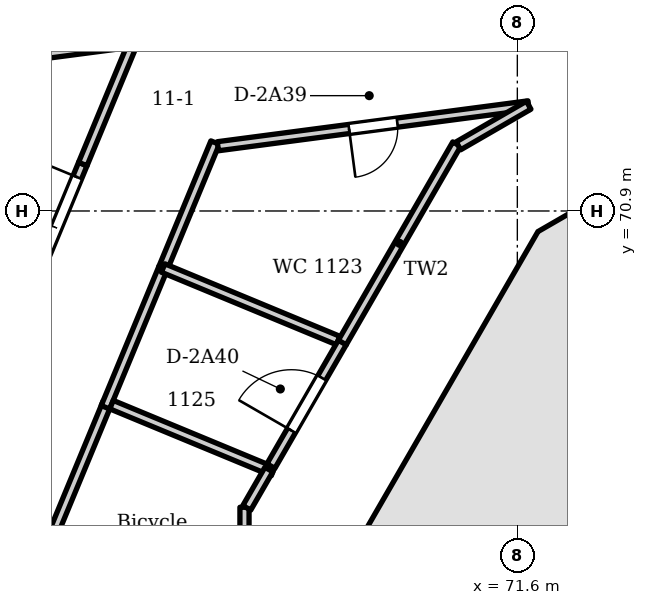
"""IFC4 building model, lengths in metres.
Left out: names, types, materials, properties, quantities, classifications, styles, units other than length and angle.
Written with IfcOpenShell. Run it as: python <this file> out.ifc"""

import sys

from ifc_helpers import new_model, si_unit, direction, frame, frame_2d, origin, place, context, subcontext, project, spatial, polyline, rectangle, outline, extrude, element, fill, save


model = new_model("IFC4")
c1 = context("Model", 3, precision=1e-05, world=origin(), true_north=direction((0.0, 1.0)))
c2 = subcontext(c1, "Body", "Model", "MODEL_VIEW")
j1 = project(units=[si_unit("LENGTHUNIT", "METRE"), si_unit("PLANEANGLEUNIT", "RADIAN")], contexts=[c1])
p1 = place(None, origin())
s1 = spatial("IfcSite", under=j1, at=p1, CompositionType="ELEMENT")
p2 = place(p1, origin())
s2 = spatial("IfcBuilding", under=s1, at=p2, CompositionType="ELEMENT")
p3 = place(p2, frame((0.0, 0.0, 50.4)))
s3 = spatial("IfcBuildingStorey", under=s2, at=p3, CompositionType="ELEMENT", Elevation=50.4)
p4 = place(p3, frame((77.35, 72.992, 0.0), z_axis=(0.0, 0.0, 1.0), x_axis=(-0.866037463336, -0.499979111662, 0.0)))
e1 = element("IfcWall", 1, at=p4, inside=s3, PredefinedType="SHEAR", context=c2, shape_type="SweptSolid", body=[
    extrude(outline(polyline([(0.0, -0.6), (5.901, -0.6), (5.58, 0.6), (0.322, 0.6), (0.0, -0.6)])), origin(), (0.0, 0.0, 1.0), 3.6),
])
p5 = place(p4, frame((1.175, 0.0, 0.0)))
e2 = element("IfcOpeningElement", 2, at=p5, cuts=e1, PredefinedType="OPENING", context=c2, shape_type="SweptSolid", body=[
    extrude(rectangle(XDim=0.9, YDim=2.1, at=frame_2d((0.45, 1.05))), frame((0.0, 0.61, 0.0), z_axis=(0.0, -1.0, 0.0), x_axis=(1.0, 0.0, 0.0)), (0.0, 0.0, 1.0), 1.22),
])
p6 = place(p3, frame((72.458, 70.261, 0.0), z_axis=(0.0, 0.0, 1.0), x_axis=(-0.499979111662, -0.866037463336, 0.0)))
e3 = element("IfcWall", 3, at=p6, inside=s3, PredefinedType="SHEAR", context=c2, shape_type="SweptSolid", body=[
    extrude(outline(polyline([(0.0, -0.6), (5.901, -0.6), (5.58, 0.6), (0.322, 0.6), (0.0, -0.6)])), origin(), (0.0, 0.0, 1.0), 3.6),
])
p7 = place(p6, frame((1.75, 0.0, 0.0)))
e4 = element("IfcOpeningElement", 4, at=p7, cuts=e3, PredefinedType="OPENING", context=c2, shape_type="SweptSolid", body=[
    extrude(rectangle(XDim=2.4, YDim=2.1, at=frame_2d((1.2, 1.05))), frame((0.0, 0.61, 0.0), z_axis=(0.0, -1.0, 0.0), x_axis=(1.0, 0.0, 0.0)), (0.0, 0.0, 1.0), 1.22),
])
p8 = place(p3, frame((76.381, 63.031, 0.0), z_axis=(0.0, 0.0, 1.0), x_axis=(-0.866032150378, 0.499988314375, 0.0)))
e5 = element("IfcWall", 5, at=p8, inside=s3, PredefinedType="SHEAR", context=c2, shape_type="SweptSolid", body=[
    extrude(rectangle(XDim=6.412, YDim=0.3, at=frame_2d((3.206, 0.0))), origin(), (0.0, 0.0, 1.0), 3.6),
])
p9 = place(p8, frame((3.55, 0.0, 0.0)))
e6 = element("IfcOpeningElement", 6, at=p9, cuts=e5, PredefinedType="OPENING", context=c2, shape_type="SweptSolid", body=[
    extrude(rectangle(XDim=1.0, YDim=2.1, at=frame_2d((0.5, 1.05))), frame((0.0, 0.16, 0.0), z_axis=(0.0, -1.0, 0.0), x_axis=(1.0, 0.0, 0.0)), (0.0, 0.0, 1.0), 0.32),
])
p10 = place(p3, frame((77.731, 65.369, 0.0), z_axis=(0.0, 0.0, 1.0), x_axis=(-0.866022631842, 0.500004801114, 0.0)))
e7 = element("IfcWall", 7, at=p10, inside=s3, PredefinedType="SHEAR", context=c2, shape_type="SweptSolid", body=[
    extrude(rectangle(XDim=6.412, YDim=0.3, at=frame_2d((3.206, 0.0))), origin(), (0.0, 0.0, 1.0), 3.6),
])
p11 = place(p10, frame((3.55, 0.0, 0.0)))
e8 = element("IfcOpeningElement", 8, at=p11, cuts=e7, PredefinedType="OPENING", context=c2, shape_type="SweptSolid", body=[
    extrude(rectangle(XDim=1.0, YDim=2.1, at=frame_2d((0.5, 1.05))), frame((0.0, 0.16, 0.0), z_axis=(0.0, -1.0, 0.0), x_axis=(1.0, 0.0, 0.0)), (0.0, 0.0, 1.0), 0.32),
])
p12 = place(p3, frame((79.969, 32.624, 0.0), z_axis=(0.0, 0.0, 1.0), x_axis=(-0.608761526367, 0.793353265585, 0.0)))
e9 = element("IfcWall", 9, at=p12, inside=s3, PredefinedType="SOLIDWALL", context=c2, shape_type="SweptSolid", body=[
    extrude(outline(polyline([(0.149, 0.075), (0.149, -0.075), (47.217, -0.075), (47.217, 0.075), (0.149, 0.075)])), origin(), (0.0, 0.0, 1.0), 3.3),
])
p13 = place(p12, frame((1.222, 0.0, 0.0)))
e10 = element("IfcOpeningElement", 10, at=p13, cuts=e9, PredefinedType="OPENING", context=c2, shape_type="SweptSolid", body=[
    extrude(rectangle(XDim=1.8, YDim=2.6, at=frame_2d((0.9, 1.3))), frame((0.0, 0.085, 0.0), z_axis=(0.0, -1.0, 0.0), x_axis=(1.0, 0.0, 0.0)), (0.0, 0.0, 1.0), 0.17),
])
p14 = place(p12, frame((4.565, 0.0, 0.0)))
e11 = element("IfcOpeningElement", 11, at=p14, cuts=e9, PredefinedType="OPENING", context=c2, shape_type="SweptSolid", body=[
    extrude(rectangle(XDim=1.8, YDim=2.6, at=frame_2d((0.9, 1.3))), frame((0.0, 0.085, 0.0), z_axis=(0.0, -1.0, 0.0), x_axis=(1.0, 0.0, 0.0)), (0.0, 0.0, 1.0), 0.17),
])
p15 = place(p12, frame((8.209, 0.0, 0.0)))
e12 = element("IfcOpeningElement", 12, at=p15, cuts=e9, PredefinedType="OPENING", context=c2, shape_type="SweptSolid", body=[
    extrude(rectangle(XDim=1.8, YDim=2.6, at=frame_2d((0.9, 1.3))), frame((0.0, 0.085, 0.0), z_axis=(0.0, -1.0, 0.0), x_axis=(1.0, 0.0, 0.0)), (0.0, 0.0, 1.0), 0.17),
])
p16 = place(p12, frame((12.453, 0.0, 0.0)))
e13 = element("IfcOpeningElement", 13, at=p16, cuts=e9, PredefinedType="OPENING", context=c2, shape_type="SweptSolid", body=[
    extrude(rectangle(XDim=1.8, YDim=2.6, at=frame_2d((0.9, 1.3))), frame((0.0, 0.085, 0.0), z_axis=(0.0, -1.0, 0.0), x_axis=(1.0, 0.0, 0.0)), (0.0, 0.0, 1.0), 0.17),
])
p17 = place(p12, frame((15.496, 0.0, 0.0)))
e14 = element("IfcOpeningElement", 14, at=p17, cuts=e9, PredefinedType="OPENING", context=c2, shape_type="SweptSolid", body=[
    extrude(rectangle(XDim=1.8, YDim=2.6, at=frame_2d((0.9, 1.3))), frame((0.0, 0.085, 0.0), z_axis=(0.0, -1.0, 0.0), x_axis=(1.0, 0.0, 0.0)), (0.0, 0.0, 1.0), 0.17),
])
p18 = place(p12, frame((18.84, 0.0, 0.15)))
e15 = element("IfcOpeningElement", 15, at=p18, cuts=e9, PredefinedType="OPENING", context=c2, shape_type="SweptSolid", body=[
    extrude(rectangle(XDim=2.4, YDim=2.45, at=frame_2d((1.2, 1.225))), frame((0.0, 0.085, 0.0), z_axis=(0.0, -1.0, 0.0), x_axis=(1.0, 0.0, 0.0)), (0.0, 0.0, 1.0), 0.17),
])
p19 = place(p12, frame((22.783, 0.0, 0.0)))
e16 = element("IfcOpeningElement", 16, at=p19, cuts=e9, PredefinedType="OPENING", context=c2, shape_type="SweptSolid", body=[
    extrude(rectangle(XDim=1.8, YDim=2.6, at=frame_2d((0.9, 1.3))), frame((0.0, 0.085, 0.0), z_axis=(0.0, -1.0, 0.0), x_axis=(1.0, 0.0, 0.0)), (0.0, 0.0, 1.0), 0.17),
])
p20 = place(p12, frame((26.127, 0.0, 0.15)))
e17 = element("IfcOpeningElement", 17, at=p20, cuts=e9, PredefinedType="OPENING", context=c2, shape_type="SweptSolid", body=[
    extrude(rectangle(XDim=2.4, YDim=2.45, at=frame_2d((1.2, 1.225))), frame((0.0, 0.085, 0.0), z_axis=(0.0, -1.0, 0.0), x_axis=(1.0, 0.0, 0.0)), (0.0, 0.0, 1.0), 0.17),
])
p21 = place(p12, frame((30.071, 0.0, 0.0)))
e18 = element("IfcOpeningElement", 18, at=p21, cuts=e9, PredefinedType="OPENING", context=c2, shape_type="SweptSolid", body=[
    extrude(rectangle(XDim=1.8, YDim=2.6, at=frame_2d((0.9, 1.3))), frame((0.0, 0.085, 0.0), z_axis=(0.0, -1.0, 0.0), x_axis=(1.0, 0.0, 0.0)), (0.0, 0.0, 1.0), 0.17),
])
p22 = place(p12, frame((33.114, 0.0, 0.0)))
e19 = element("IfcOpeningElement", 19, at=p22, cuts=e9, PredefinedType="OPENING", context=c2, shape_type="SweptSolid", body=[
    extrude(rectangle(XDim=1.8, YDim=2.6, at=frame_2d((0.9, 1.3))), frame((0.0, 0.085, 0.0), z_axis=(0.0, -1.0, 0.0), x_axis=(1.0, 0.0, 0.0)), (0.0, 0.0, 1.0), 0.17),
])
p23 = place(p12, frame((37.358, 0.0, 0.0)))
e20 = element("IfcOpeningElement", 20, at=p23, cuts=e9, PredefinedType="OPENING", context=c2, shape_type="SweptSolid", body=[
    extrude(rectangle(XDim=1.8, YDim=2.6, at=frame_2d((0.9, 1.3))), frame((0.0, 0.085, 0.0), z_axis=(0.0, -1.0, 0.0), x_axis=(1.0, 0.0, 0.0)), (0.0, 0.0, 1.0), 0.17),
])
p24 = place(p12, frame((41.001, 0.0, 0.0)))
e21 = element("IfcOpeningElement", 21, at=p24, cuts=e9, PredefinedType="OPENING", context=c2, shape_type="SweptSolid", body=[
    extrude(rectangle(XDim=1.8, YDim=2.6, at=frame_2d((0.9, 1.3))), frame((0.0, 0.085, 0.0), z_axis=(0.0, -1.0, 0.0), x_axis=(1.0, 0.0, 0.0)), (0.0, 0.0, 1.0), 0.17),
])
p25 = place(p12, frame((44.345, 0.0, 0.0)))
e22 = element("IfcOpeningElement", 22, at=p25, cuts=e9, PredefinedType="OPENING", context=c2, shape_type="SweptSolid", body=[
    extrude(rectangle(XDim=1.8, YDim=2.6, at=frame_2d((0.9, 1.3))), frame((0.0, 0.085, 0.0), z_axis=(0.0, -1.0, 0.0), x_axis=(1.0, 0.0, 0.0)), (0.0, 0.0, 1.0), 0.17),
])
p26 = place(p3, frame((57.534, 70.427, 0.0), z_axis=(0.0, 0.0, 1.0), x_axis=(0.608794371867, -0.793328061261, 0.0)))
e23 = element("IfcWall", 23, at=p26, inside=s3, PredefinedType="PARTITIONING", context=c2, shape_type="SweptSolid", body=[
    extrude(rectangle(XDim=19.759, YDim=0.15, at=frame_2d((9.88, 0.0))), origin(), (0.0, 0.0, 1.0), 3.3),
])
p27 = place(p26, frame((18.293, 0.0, 0.0)))
e24 = element("IfcOpeningElement", 24, at=p27, cuts=e23, PredefinedType="OPENING", context=c2, shape_type="SweptSolid", body=[
    extrude(rectangle(XDim=0.9, YDim=2.1, at=frame_2d((0.45, 1.05))), frame((0.0, 0.085, 0.0), z_axis=(0.0, -1.0, 0.0), x_axis=(1.0, 0.0, 0.0)), (0.0, 0.0, 1.0), 0.17),
])
p28 = place(p26, frame((17.093, 0.0, 0.0)))
e25 = element("IfcOpeningElement", 25, at=p28, cuts=e23, PredefinedType="OPENING", context=c2, shape_type="SweptSolid", body=[
    extrude(rectangle(XDim=0.9, YDim=2.1, at=frame_2d((0.45, 1.05))), frame((0.0, 0.085, 0.0), z_axis=(0.0, -1.0, 0.0), x_axis=(1.0, 0.0, 0.0)), (0.0, 0.0, 1.0), 0.17),
])
p29 = place(p26, frame((11.006, 0.0, 0.0)))
e26 = element("IfcOpeningElement", 26, at=p29, cuts=e23, PredefinedType="OPENING", context=c2, shape_type="SweptSolid", body=[
    extrude(rectangle(XDim=0.9, YDim=2.1, at=frame_2d((0.45, 1.05))), frame((0.0, 0.085, 0.0), z_axis=(0.0, -1.0, 0.0), x_axis=(1.0, 0.0, 0.0)), (0.0, 0.0, 1.0), 0.17),
])
p30 = place(p26, frame((9.806, 0.0, 0.0)))
e27 = element("IfcOpeningElement", 27, at=p30, cuts=e23, PredefinedType="OPENING", context=c2, shape_type="SweptSolid", body=[
    extrude(rectangle(XDim=0.9, YDim=2.1, at=frame_2d((0.45, 1.05))), frame((0.0, 0.085, 0.0), z_axis=(0.0, -1.0, 0.0), x_axis=(1.0, 0.0, 0.0)), (0.0, 0.0, 1.0), 0.17),
])
p31 = place(p3, frame((62.522, 67.007, 0.0), z_axis=(0.0, 0.0, 1.0), x_axis=(0.382650715136, 0.923893083753, 0.0)))
e28 = element("IfcWall", 28, at=p31, inside=s3, PredefinedType="PARTITIONING", context=c2, shape_type="SweptSolid", body=[
    extrude(rectangle(XDim=5.049, YDim=0.15, at=frame_2d((2.525, 0.0))), origin(), (0.0, 0.0, 1.0), 2.75),
])
p32 = place(p31, frame((3.014, 0.0, 0.0)))
e29 = element("IfcOpeningElement", 29, at=p32, cuts=e28, PredefinedType="OPENING", context=c2, shape_type="SweptSolid", body=[
    extrude(rectangle(XDim=1.8, YDim=2.1, at=frame_2d((0.9, 1.05))), frame((0.0, 0.085, 0.0), z_axis=(0.0, -1.0, 0.0), x_axis=(1.0, 0.0, 0.0)), (0.0, 0.0, 1.0), 0.17),
])
p33 = place(p3, frame((63.723, 73.467, 0.0), z_axis=(0.0, 0.0, 1.0), x_axis=(0.991489487772, 0.130186772134, 0.0)))
e30 = element("IfcWall", 30, at=p33, inside=s3, PredefinedType="PARTITIONING", context=c2, shape_type="SweptSolid", body=[
    extrude(rectangle(XDim=1.958, YDim=0.15, at=frame_2d((0.979, 0.0))), origin(), (0.0, 0.0, 1.0), 3.3),
])
p34 = place(p3, frame((63.811, 65.22, 0.0), z_axis=(0.0, 0.0, 1.0), x_axis=(0.382485754441, 0.923961388614, 0.0)))
e31 = element("IfcWall", 31, at=p34, inside=s3, PredefinedType="PARTITIONING", context=c2, shape_type="SweptSolid", body=[
    extrude(rectangle(XDim=2.736, YDim=0.15, at=frame_2d((1.368, 0.0))), origin(), (0.0, 0.0, 1.0), 3.3),
])
p35 = place(p3, frame((64.454, 71.672, 0.0), z_axis=(0.0, 0.0, 1.0), x_axis=(0.382922635391, 0.923780415091, 0.0)))
e32 = element("IfcWall", 32, at=p35, inside=s3, PredefinedType="PARTITIONING", context=c2, shape_type="SweptSolid", body=[
    extrude(rectangle(XDim=2.09, YDim=0.15, at=frame_2d((1.045, 0.0))), origin(), (0.0, 0.0, 1.0), 3.3),
])
p36 = place(p3, frame((64.826, 67.672, 0.0), z_axis=(0.0, 0.0, 1.0), x_axis=(0.382785873713, 0.923837093261, 0.0)))
e33 = element("IfcWall", 33, at=p36, inside=s3, PredefinedType="PARTITIONING", context=c2, shape_type="SweptSolid", body=[
    extrude(rectangle(XDim=2.484, YDim=0.15, at=frame_2d((1.242, 0.0))), origin(), (0.0, 0.0, 1.0), 2.75),
])
p37 = place(p3, frame((64.926, 67.715, 0.0), z_axis=(0.0, 0.0, 1.0), x_axis=(0.923886418472, -0.382666807761, 0.0)))
e34 = element("IfcWall", 34, at=p37, inside=s3, PredefinedType="PARTITIONING", context=c2, shape_type="SweptSolid", body=[
    extrude(rectangle(XDim=2.875, YDim=0.15, at=frame_2d((1.438, 0.0))), origin(), (0.0, 0.0, 1.0), 3.3),
])
p38 = place(p3, frame((65.774, 69.958, 0.0), z_axis=(0.0, 0.0, 1.0), x_axis=(0.382599241046, 0.923914401203, 0.0)))
e35 = element("IfcWall", 35, at=p38, inside=s3, PredefinedType="PARTITIONING", context=c2, shape_type="SweptSolid", body=[
    extrude(rectangle(XDim=2.237, YDim=0.15, at=frame_2d((1.118, 0.0))), origin(), (0.0, 0.0, 1.0), 3.3),
])
p39 = place(p3, frame((65.775, 69.962, 0.0), z_axis=(0.0, 0.0, 1.0), x_axis=(0.923918484918, -0.382589379397, 0.0)))
e36 = element("IfcWall", 36, at=p39, inside=s3, PredefinedType="PARTITIONING", context=c2, shape_type="SweptSolid", body=[
    extrude(rectangle(XDim=3.116, YDim=0.15, at=frame_2d((1.558, 0.0))), origin(), (0.0, 0.0, 1.0), 3.3),
])
p40 = place(p3, frame((66.675, 71.965, 0.0), z_axis=(0.0, 0.0, 1.0), x_axis=(0.991459293276, 0.130416524172, 0.0)))
e37 = element("IfcWall", 37, at=p40, inside=s3, PredefinedType="PARTITIONING", context=c2, shape_type="SweptSolid", body=[
    extrude(rectangle(XDim=5.154, YDim=0.15, at=frame_2d((2.577, 0.0))), origin(), (0.0, 0.0, 1.0), 3.3),
])
p41 = place(p40, frame((2.176, 0.0, 0.0)))
e38 = element("IfcOpeningElement", 38, at=p41, cuts=e37, PredefinedType="OPENING", context=c2, shape_type="SweptSolid", body=[
    extrude(rectangle(XDim=0.8, YDim=2.1, at=frame_2d((0.4, 1.05))), frame((0.0, 0.085, 0.0), z_axis=(0.0, -1.0, 0.0), x_axis=(1.0, 0.0, 0.0)), (0.0, 0.0, 1.0), 0.17),
])
p42 = place(p3, frame((67.113, 61.094, 0.0), z_axis=(0.0, 0.0, 1.0), x_axis=(0.0, 1.0, 0.0)))
e39 = element("IfcWall", 39, at=p42, inside=s3, PredefinedType="PARTITIONING", context=c2, shape_type="SweptSolid", body=[
    extrude(rectangle(XDim=4.934, YDim=0.15, at=frame_2d((2.467, 0.0))), origin(), (0.0, 0.0, 1.0), 3.3),
])
p43 = place(p3, frame((67.15, 66.018, 0.0), z_axis=(0.0, 0.0, 1.0), x_axis=(0.499858068882, 0.866107332248, 0.0)))
e40 = element("IfcWall", 40, at=p43, inside=s3, PredefinedType="PARTITIONING", context=c2, shape_type="SweptSolid", body=[
    extrude(rectangle(XDim=0.727, YDim=0.15, at=frame_2d((0.364, 0.0))), origin(), (0.0, 0.0, 1.0), 3.3),
])
p44 = place(p3, frame((67.548, 66.705, 0.0), z_axis=(0.0, 0.0, 1.0), x_axis=(0.500075472253, 0.865981825474, 0.0)))
e41 = element("IfcWall", 41, at=p44, inside=s3, PredefinedType="PARTITIONING", context=c2, shape_type="SweptSolid", body=[
    extrude(rectangle(XDim=2.355, YDim=0.15, at=frame_2d((1.177, 0.0))), origin(), (0.0, 0.0, 1.0), 2.75),
])
p45 = place(p44, frame((0.676, 0.0, 0.0)))
e42 = element("IfcOpeningElement", 42, at=p45, cuts=e41, PredefinedType="OPENING", context=c2, shape_type="SweptSolid", body=[
    extrude(rectangle(XDim=1.0, YDim=2.1, at=frame_2d((0.5, 1.05))), frame((0.0, 0.085, 0.0), z_axis=(0.0, -1.0, 0.0), x_axis=(1.0, 0.0, 0.0)), (0.0, 0.0, 1.0), 0.17),
])
p46 = place(p3, frame((68.721, 68.737, 0.0), z_axis=(0.0, 0.0, 1.0), x_axis=(0.499855260579, 0.866108953002, 0.0)))
e43 = element("IfcWall", 43, at=p46, inside=s3, PredefinedType="PARTITIONING", context=c2, shape_type="SweptSolid", body=[
    extrude(rectangle(XDim=3.766, YDim=0.15, at=frame_2d((1.883, 0.0))), origin(), (0.0, 0.0, 1.0), 3.3),
])
p47 = place(p3, frame((70.631, 71.971, 0.0), z_axis=(0.0, 0.0, 1.0), x_axis=(0.865822790046, 0.500350773195, 0.0)))
e44 = element("IfcWall", 44, at=p47, inside=s3, PredefinedType="PARTITIONING", context=c2, shape_type="SweptSolid", body=[
    extrude(rectangle(XDim=1.334, YDim=0.15, at=frame_2d((0.667, 0.0))), origin(), (0.0, 0.0, 1.0), 3.3),
])
p48 = place(p32, origin())
e45 = element("IfcDoor", 45, at=p48, inside=s3, OperationType="DOUBLE_DOOR_DOUBLE_SWING", PredefinedType="DOOR", context=c2, shape_type="SweptSolid", body=[
    extrude(rectangle(XDim=1.8, YDim=2.1, at=frame_2d((0.9, 1.05))), frame((0.0, 0.025, 0.0), z_axis=(0.0, -1.0, 0.0), x_axis=(1.0, 0.0, 0.0)), (0.0, 0.0, 1.0), 0.05),
])
fill(e29, e45)
p49 = place(p41, frame((0.8, 0.0, 0.0), z_axis=(0.0, 0.0, 1.0), x_axis=(-1.0, 0.0, 0.0)))
e46 = element("IfcDoor", 46, at=p49, inside=s3, OperationType="SINGLE_SWING_RIGHT", PredefinedType="DOOR", context=c2, shape_type="SweptSolid", body=[
    extrude(rectangle(XDim=0.8, YDim=2.1, at=frame_2d((0.4, 1.05))), frame((0.0, 0.025, 0.0), z_axis=(0.0, -1.0, 0.0), x_axis=(1.0, 0.0, 0.0)), (0.0, 0.0, 1.0), 0.05),
])
fill(e38, e46)
p50 = place(p45, origin())
e47 = element("IfcDoor", 47, at=p50, inside=s3, OperationType="SINGLE_SWING_LEFT", PredefinedType="DOOR", context=c2, shape_type="SweptSolid", body=[
    extrude(rectangle(XDim=1.0, YDim=2.1, at=frame_2d((0.5, 1.05))), frame((0.0, 0.025, 0.0), z_axis=(0.0, -1.0, 0.0), x_axis=(1.0, 0.0, 0.0)), (0.0, 0.0, 1.0), 0.05),
])
fill(e42, e47)
p51 = place(p7, origin())
e48 = element("IfcDoor", 48, at=p51, inside=s3, OperationType="DOUBLE_DOOR_SINGLE_SWING", PredefinedType="DOOR", context=c2, shape_type="SweptSolid", body=[
    extrude(rectangle(XDim=2.4, YDim=2.1, at=frame_2d((1.2, 1.05))), frame((0.0, 0.025, 0.0), z_axis=(0.0, -1.0, 0.0), x_axis=(1.0, 0.0, 0.0)), (0.0, 0.0, 1.0), 0.05),
])
fill(e4, e48)
save(model, sys.argv[1])
